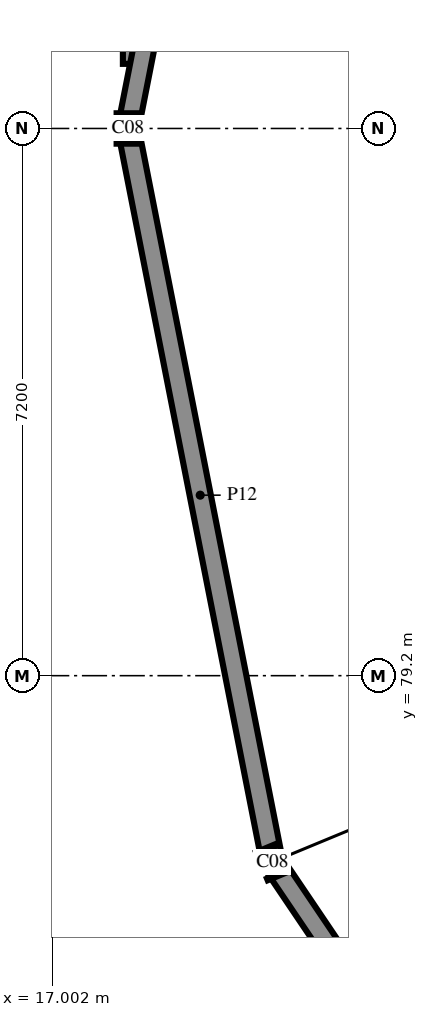
"""IFC4 building model, lengths in metres.
Left out: names, types, materials, properties, quantities, classifications, styles, units other than length and angle.
Written with IfcOpenShell. Run it as: python <this file> out.ifc"""

import sys

from ifc_helpers import new_model, si_unit, direction, frame, frame_2d, origin, origin_2d, place, context, subcontext, project, spatial, rectangle, i_section, extrude, element, save


model = new_model("IFC4")
c1 = context("Model", 3, precision=1e-05, world=origin(), true_north=direction((0.0, 1.0)))
c2 = subcontext(c1, "Body", "Model", "MODEL_VIEW")
j1 = project(units=[si_unit("LENGTHUNIT", "METRE"), si_unit("PLANEANGLEUNIT", "RADIAN")], contexts=[c1])
p1 = place(None, origin())
s1 = spatial("IfcSite", under=j1, at=p1, CompositionType="ELEMENT")
p2 = place(p1, origin())
s2 = spatial("IfcBuilding", under=s1, at=p2, CompositionType="ELEMENT")
p3 = place(p2, frame((0.0, 0.0, 14.4)))
s3 = spatial("IfcBuildingStorey", under=s2, at=p3, CompositionType="ELEMENT", Elevation=14.4)
for number, where, z_axis, x_axis in (
    (1, (18.0, 86.4, 0.0), (0.0, 0.0, 1.0), (-1.0, 0.0, 0.0)),
    (2, (19.9, 76.75, 0.0), (0.0, 0.0, 1.0), (-0.924, -0.383, 0.0)),
):
    element("IfcColumn", number, at=place(p3, frame(where, z_axis=z_axis, x_axis=x_axis)), inside=s3, PredefinedType="COLUMN", context=c2, shape_type="SweptSolid", body=[
        extrude(i_section(OverallWidth=0.3, OverallDepth=0.4, WebThickness=0.013, FlangeThickness=0.024, FilletRadius=0.027, at=origin_2d()), origin(), (0.0, 0.0, 1.0), 3.6),
    ])
p4 = place(p3, frame((18.0, 92.982, 0.0), z_axis=(0.0, 0.0, 1.0), x_axis=(0.0, -1.0, 0.0)))
e3 = element("IfcWall", 3, at=p4, inside=s3, PredefinedType="PARTITIONING", context=c2, shape_type="SweptSolid", body=[
    extrude(rectangle(XDim=5.732, YDim=0.135, at=frame_2d((2.866, 0.0))), origin(), (0.0, 0.0, 1.0), 3.42),
])
p5 = place(p3, frame((18.0, 86.4, 0.0), z_axis=(0.0, 0.0, 1.0), x_axis=(0.193174651092, -0.981164386928, 0.0)))
e4 = element("IfcWall", 4, at=p5, inside=s3, PredefinedType="PARTITIONING", context=c2, shape_type="SweptSolid", body=[
    extrude(rectangle(XDim=9.835, YDim=0.275, at=frame_2d((4.917, 0.0))), origin(), (0.0, 0.0, 1.0), 3.07),
])
p6 = place(p3, frame((19.9, 76.75, 0.0), z_axis=(0.0, 0.0, 1.0), x_axis=(0.559390118145, -0.828904515443, 0.0)))
e5 = element("IfcWall", 5, at=p6, inside=s3, PredefinedType="PARTITIONING", context=c2, shape_type="SweptSolid", body=[
    extrude(rectangle(XDim=9.832, YDim=0.275, at=frame_2d((4.916, 0.0))), origin(), (0.0, 0.0, 1.0), 3.07),
])
p7 = place(p6, frame((3.85, 0.0, 0.0)))
e6 = element("IfcOpeningElement", 6, at=p7, cuts=e5, PredefinedType="OPENING", context=c2, shape_type="SweptSolid", body=[
    extrude(rectangle(XDim=2.1, YDim=2.4, at=frame_2d((1.05, 1.2))), frame((0.0, 0.147, 0.0), z_axis=(0.0, -1.0, 0.0), x_axis=(1.0, 0.0, 0.0)), (0.0, 0.0, 1.0), 0.295),
])
p8 = place(p3, frame((19.296, 92.984, 0.0), z_axis=(0.0, 0.0, 1.0), x_axis=(-0.193190675653, -0.981161231827, 0.0)))
e7 = element("IfcWall", 7, at=p8, inside=s3, PredefinedType="PARTITIONING", context=c2, shape_type="SweptSolid", body=[
    extrude(rectangle(XDim=6.71, YDim=0.275, at=frame_2d((3.355, 0.0))), origin(), (0.0, 0.0, 1.0), 3.07),
])
save(model, sys.argv[1])
